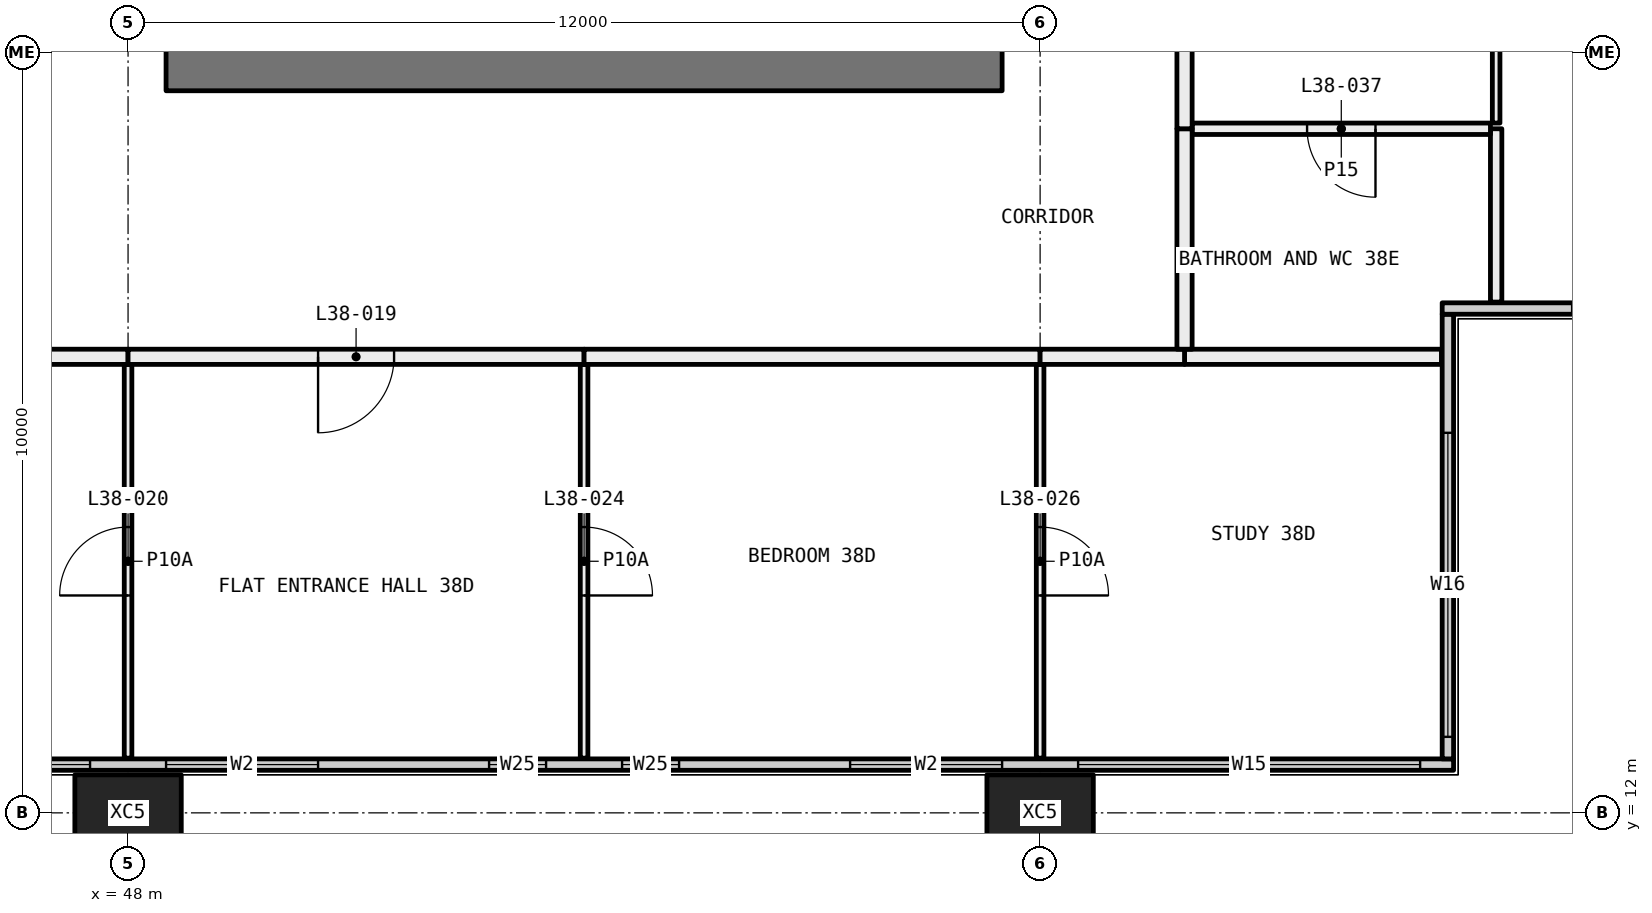
"""IFC4 building model, lengths in metres.
Left out: names, types, materials, properties, quantities, classifications, styles, units other than length and angle.
Written with IfcOpenShell. Run it as: python <this file> out.ifc"""

import sys

from ifc_helpers import new_model, si_unit, direction, frame, frame_2d, origin, origin_2d, place, context, subcontext, project, spatial, rectangle, hollow_rectangle, extrude, element, fill, save


model = new_model("IFC4")
c1 = context("Model", 3, precision=1e-05, world=origin(), true_north=direction((0.0, 1.0)))
c2 = subcontext(c1, "Body", "Model", "MODEL_VIEW")
j1 = project(units=[si_unit("LENGTHUNIT", "METRE"), si_unit("PLANEANGLEUNIT", "RADIAN")], contexts=[c1])
p1 = place(None, origin())
s1 = spatial("IfcSite", under=j1, at=p1, CompositionType="ELEMENT")
p2 = place(p1, origin())
s2 = spatial("IfcBuilding", under=s1, at=p2, CompositionType="ELEMENT")
p3 = place(p2, frame((0.0, 0.0, 144.9)))
s3 = spatial("IfcBuildingStorey", under=s2, at=p3, CompositionType="ELEMENT", Elevation=144.9)
for number, where, z_axis, x_axis in (
    (1, (48.0, 12.0, -0.4), (0.0, 0.0, 1.0), (1.0, 0.0, 0.0)),
    (2, (60.0, 12.0, -0.4), (0.0, 0.0, 1.0), (1.0, 0.0, 0.0)),
):
    element("IfcColumn", number, at=place(p3, frame(where, z_axis=z_axis, x_axis=x_axis)), inside=s3, PredefinedType="COLUMN", context=c2, shape_type="SweptSolid", body=[
        extrude(hollow_rectangle(XDim=1.4, YDim=1.0, WallThickness=0.055, at=origin_2d()), origin(), (0.0, 0.0, 1.0), 3.45),
    ])
p4 = place(p3, frame((6.56, 12.635, 0.0), z_axis=(0.0, 0.0, 1.0), x_axis=(1.0, 0.0, 0.0)))
e3 = element("IfcWall", 3, at=p4, inside=s3, PredefinedType="ELEMENTEDWALL", context=c2, shape_type="SweptSolid", body=[
    extrude(rectangle(XDim=58.88, YDim=0.15, at=frame_2d((29.44, 0.0))), origin(), (0.0, 0.0, 1.0), 3.05),
])
p5 = place(p4, frame((0.44, 0.0, 0.45)))
e4 = element("IfcOpeningElement", 4, at=p5, cuts=e3, PredefinedType="OPENING", context=c2, shape_type="SweptSolid", body=[
    extrude(rectangle(XDim=4.5, YDim=2.55, at=frame_2d((2.25, 1.275))), frame((0.0, 0.085, 0.0), z_axis=(0.0, -1.0, 0.0), x_axis=(1.0, 0.0, 0.0)), (0.0, 0.0, 1.0), 0.17),
])
p6 = place(p4, frame((5.94, 0.0, 0.45)))
e5 = element("IfcOpeningElement", 5, at=p6, cuts=e3, PredefinedType="OPENING", context=c2, shape_type="SweptSolid", body=[
    extrude(rectangle(XDim=2.0, YDim=2.55, at=frame_2d((1.0, 1.275))), frame((0.0, 0.085, 0.0), z_axis=(0.0, -1.0, 0.0), x_axis=(1.0, 0.0, 0.0)), (0.0, 0.0, 1.0), 0.17),
])
p7 = place(p4, frame((10.19, 0.0, 0.45)))
e6 = element("IfcOpeningElement", 6, at=p7, cuts=e3, PredefinedType="OPENING", context=c2, shape_type="SweptSolid", body=[
    extrude(rectangle(XDim=0.75, YDim=2.55, at=frame_2d((0.375, 1.275))), frame((0.0, 0.085, 0.0), z_axis=(0.0, -1.0, 0.0), x_axis=(1.0, 0.0, 0.0)), (0.0, 0.0, 1.0), 0.17),
])
p8 = place(p4, frame((11.94, 0.0, 0.45)))
e7 = element("IfcOpeningElement", 7, at=p8, cuts=e3, PredefinedType="OPENING", context=c2, shape_type="SweptSolid", body=[
    extrude(rectangle(XDim=0.75, YDim=2.55, at=frame_2d((0.375, 1.275))), frame((0.0, 0.085, 0.0), z_axis=(0.0, -1.0, 0.0), x_axis=(1.0, 0.0, 0.0)), (0.0, 0.0, 1.0), 0.17),
])
p9 = place(p4, frame((14.94, 0.0, 0.45)))
e8 = element("IfcOpeningElement", 8, at=p9, cuts=e3, PredefinedType="OPENING", context=c2, shape_type="SweptSolid", body=[
    extrude(rectangle(XDim=2.0, YDim=2.55, at=frame_2d((1.0, 1.275))), frame((0.0, 0.085, 0.0), z_axis=(0.0, -1.0, 0.0), x_axis=(1.0, 0.0, 0.0)), (0.0, 0.0, 1.0), 0.17),
])
p10 = place(p4, frame((17.94, 0.0, 0.45)))
e9 = element("IfcOpeningElement", 9, at=p10, cuts=e3, PredefinedType="OPENING", context=c2, shape_type="SweptSolid", body=[
    extrude(rectangle(XDim=2.0, YDim=2.55, at=frame_2d((1.0, 1.275))), frame((0.0, 0.085, 0.0), z_axis=(0.0, -1.0, 0.0), x_axis=(1.0, 0.0, 0.0)), (0.0, 0.0, 1.0), 0.17),
])
p11 = place(p4, frame((22.19, 0.0, 0.45)))
e10 = element("IfcOpeningElement", 10, at=p11, cuts=e3, PredefinedType="OPENING", context=c2, shape_type="SweptSolid", body=[
    extrude(rectangle(XDim=0.75, YDim=2.55, at=frame_2d((0.375, 1.275))), frame((0.0, 0.085, 0.0), z_axis=(0.0, -1.0, 0.0), x_axis=(1.0, 0.0, 0.0)), (0.0, 0.0, 1.0), 0.17),
])
p12 = place(p4, frame((23.94, 0.0, 0.45)))
e11 = element("IfcOpeningElement", 11, at=p12, cuts=e3, PredefinedType="OPENING", context=c2, shape_type="SweptSolid", body=[
    extrude(rectangle(XDim=0.75, YDim=2.55, at=frame_2d((0.375, 1.275))), frame((0.0, 0.085, 0.0), z_axis=(0.0, -1.0, 0.0), x_axis=(1.0, 0.0, 0.0)), (0.0, 0.0, 1.0), 0.17),
])
p13 = place(p4, frame((26.94, 0.0, 0.45)))
e12 = element("IfcOpeningElement", 12, at=p13, cuts=e3, PredefinedType="OPENING", context=c2, shape_type="SweptSolid", body=[
    extrude(rectangle(XDim=2.0, YDim=2.55, at=frame_2d((1.0, 1.275))), frame((0.0, 0.085, 0.0), z_axis=(0.0, -1.0, 0.0), x_axis=(1.0, 0.0, 0.0)), (0.0, 0.0, 1.0), 0.17),
])
p14 = place(p4, frame((29.94, 0.0, 0.45)))
e13 = element("IfcOpeningElement", 13, at=p14, cuts=e3, PredefinedType="OPENING", context=c2, shape_type="SweptSolid", body=[
    extrude(rectangle(XDim=2.0, YDim=2.55, at=frame_2d((1.0, 1.275))), frame((0.0, 0.085, 0.0), z_axis=(0.0, -1.0, 0.0), x_axis=(1.0, 0.0, 0.0)), (0.0, 0.0, 1.0), 0.17),
])
p15 = place(p4, frame((34.19, 0.0, 0.45)))
e14 = element("IfcOpeningElement", 14, at=p15, cuts=e3, PredefinedType="OPENING", context=c2, shape_type="SweptSolid", body=[
    extrude(rectangle(XDim=0.75, YDim=2.55, at=frame_2d((0.375, 1.275))), frame((0.0, 0.085, 0.0), z_axis=(0.0, -1.0, 0.0), x_axis=(1.0, 0.0, 0.0)), (0.0, 0.0, 1.0), 0.17),
])
p16 = place(p4, frame((35.94, 0.0, 0.45)))
e15 = element("IfcOpeningElement", 15, at=p16, cuts=e3, PredefinedType="OPENING", context=c2, shape_type="SweptSolid", body=[
    extrude(rectangle(XDim=0.75, YDim=2.55, at=frame_2d((0.375, 1.275))), frame((0.0, 0.085, 0.0), z_axis=(0.0, -1.0, 0.0), x_axis=(1.0, 0.0, 0.0)), (0.0, 0.0, 1.0), 0.17),
])
p17 = place(p4, frame((38.94, 0.0, 0.45)))
e16 = element("IfcOpeningElement", 16, at=p17, cuts=e3, PredefinedType="OPENING", context=c2, shape_type="SweptSolid", body=[
    extrude(rectangle(XDim=2.0, YDim=2.55, at=frame_2d((1.0, 1.275))), frame((0.0, 0.085, 0.0), z_axis=(0.0, -1.0, 0.0), x_axis=(1.0, 0.0, 0.0)), (0.0, 0.0, 1.0), 0.17),
])
p18 = place(p4, frame((41.94, 0.0, 0.45)))
e17 = element("IfcOpeningElement", 17, at=p18, cuts=e3, PredefinedType="OPENING", context=c2, shape_type="SweptSolid", body=[
    extrude(rectangle(XDim=2.0, YDim=2.55, at=frame_2d((1.0, 1.275))), frame((0.0, 0.085, 0.0), z_axis=(0.0, -1.0, 0.0), x_axis=(1.0, 0.0, 0.0)), (0.0, 0.0, 1.0), 0.17),
])
p19 = place(p4, frame((46.19, 0.0, 0.45)))
e18 = element("IfcOpeningElement", 18, at=p19, cuts=e3, PredefinedType="OPENING", context=c2, shape_type="SweptSolid", body=[
    extrude(rectangle(XDim=0.75, YDim=2.55, at=frame_2d((0.375, 1.275))), frame((0.0, 0.085, 0.0), z_axis=(0.0, -1.0, 0.0), x_axis=(1.0, 0.0, 0.0)), (0.0, 0.0, 1.0), 0.17),
])
p20 = place(p4, frame((47.94, 0.0, 0.45)))
e19 = element("IfcOpeningElement", 19, at=p20, cuts=e3, PredefinedType="OPENING", context=c2, shape_type="SweptSolid", body=[
    extrude(rectangle(XDim=0.75, YDim=2.55, at=frame_2d((0.375, 1.275))), frame((0.0, 0.085, 0.0), z_axis=(0.0, -1.0, 0.0), x_axis=(1.0, 0.0, 0.0)), (0.0, 0.0, 1.0), 0.17),
])
p21 = place(p4, frame((50.94, 0.0, 0.45)))
e20 = element("IfcOpeningElement", 20, at=p21, cuts=e3, PredefinedType="OPENING", context=c2, shape_type="SweptSolid", body=[
    extrude(rectangle(XDim=2.0, YDim=2.55, at=frame_2d((1.0, 1.275))), frame((0.0, 0.085, 0.0), z_axis=(0.0, -1.0, 0.0), x_axis=(1.0, 0.0, 0.0)), (0.0, 0.0, 1.0), 0.17),
])
p22 = place(p4, frame((53.94, 0.0, 0.45)))
e21 = element("IfcOpeningElement", 21, at=p22, cuts=e3, PredefinedType="OPENING", context=c2, shape_type="SweptSolid", body=[
    extrude(rectangle(XDim=4.5, YDim=2.55, at=frame_2d((2.25, 1.275))), frame((0.0, 0.085, 0.0), z_axis=(0.0, -1.0, 0.0), x_axis=(1.0, 0.0, 0.0)), (0.0, 0.0, 1.0), 0.17),
])
p23 = place(p3, frame((65.365, 12.71, 0.0), z_axis=(0.0, 0.0, 1.0), x_axis=(0.0, 1.0, 0.0)))
e22 = element("IfcWall", 22, at=p23, inside=s3, PredefinedType="ELEMENTEDWALL", context=c2, shape_type="SweptSolid", body=[
    extrude(rectangle(XDim=5.85, YDim=0.15, at=frame_2d((2.925, 0.0))), origin(), (0.0, 0.0, 1.0), 3.05),
])
p24 = place(p23, frame((0.29, 0.0, 0.45)))
e23 = element("IfcOpeningElement", 23, at=p24, cuts=e22, PredefinedType="OPENING", context=c2, shape_type="SweptSolid", body=[
    extrude(rectangle(XDim=4.0, YDim=2.55, at=frame_2d((2.0, 1.275))), frame((0.0, 0.085, 0.0), z_axis=(0.0, -1.0, 0.0), x_axis=(1.0, 0.0, 0.0)), (0.0, 0.0, 1.0), 0.17),
])
p25 = place(p3, frame((65.29, 18.635, 0.0), z_axis=(0.0, 0.0, 1.0), x_axis=(1.0, 0.0, 0.0)))
e24 = element("IfcWall", 24, at=p25, inside=s3, PredefinedType="ELEMENTEDWALL", context=c2, shape_type="SweptSolid", body=[
    extrude(rectangle(XDim=6.15, YDim=0.15, at=frame_2d((3.075, 0.0))), origin(), (0.0, 0.0, 1.0), 3.05),
])
p26 = place(p25, frame((1.71, 0.0, 0.45)))
e25 = element("IfcOpeningElement", 25, at=p26, cuts=e24, PredefinedType="OPENING", context=c2, shape_type="SweptSolid", body=[
    extrude(rectangle(XDim=4.0, YDim=2.55, at=frame_2d((2.0, 1.275))), frame((0.0, 0.085, 0.0), z_axis=(0.0, -1.0, 0.0), x_axis=(1.0, 0.0, 0.0)), (0.0, 0.0, 1.0), 0.17),
])
p27 = place(p3, frame((48.0, 12.72, 0.0), z_axis=(0.0, 0.0, 1.0), x_axis=(0.0, 1.0, 0.0)))
e26 = element("IfcWall", 26, at=p27, inside=s3, PredefinedType="PARTITIONING", context=c2, shape_type="SweptSolid", body=[
    extrude(rectangle(XDim=5.18, YDim=0.1, at=frame_2d((2.59, 0.0))), origin(), (0.0, 0.0, 1.0), 3.05),
])
p28 = place(p27, frame((2.14, 0.0, 0.0)))
e27 = element("IfcOpeningElement", 27, at=p28, cuts=e26, PredefinedType="OPENING", context=c2, shape_type="SweptSolid", body=[
    extrude(rectangle(XDim=0.9, YDim=2.1, at=frame_2d((0.45, 1.05))), frame((0.0, 0.06, 0.0), z_axis=(0.0, -1.0, 0.0), x_axis=(1.0, 0.0, 0.0)), (0.0, 0.0, 1.0), 0.12),
])
p29 = place(p3, frame((48.0, 18.0, 0.0), z_axis=(0.0, 0.0, 1.0), x_axis=(-1.0, 0.0, 0.0)))
e28 = element("IfcWall", 28, at=p29, inside=s3, PredefinedType="PARTITIONING", context=c2, shape_type="SweptSolid", body=[
    extrude(rectangle(XDim=1.9, YDim=0.2, at=frame_2d((0.95, 0.0))), origin(), (0.0, 0.0, 1.0), 3.05),
])
p30 = place(p3, frame((54.0, 12.72, 0.0), z_axis=(0.0, 0.0, 1.0), x_axis=(0.0, 1.0, 0.0)))
e29 = element("IfcWall", 29, at=p30, inside=s3, PredefinedType="PARTITIONING", context=c2, shape_type="SweptSolid", body=[
    extrude(rectangle(XDim=5.18, YDim=0.1, at=frame_2d((2.59, 0.0))), origin(), (0.0, 0.0, 1.0), 3.05),
])
p31 = place(p30, frame((2.14, 0.0, 0.0)))
e30 = element("IfcOpeningElement", 30, at=p31, cuts=e29, PredefinedType="OPENING", context=c2, shape_type="SweptSolid", body=[
    extrude(rectangle(XDim=0.9, YDim=2.1, at=frame_2d((0.45, 1.05))), frame((0.0, 0.06, 0.0), z_axis=(0.0, -1.0, 0.0), x_axis=(1.0, 0.0, 0.0)), (0.0, 0.0, 1.0), 0.12),
])
p32 = place(p3, frame((54.0, 18.0, 0.0), z_axis=(0.0, 0.0, 1.0), x_axis=(-1.0, 0.0, 0.0)))
e31 = element("IfcWall", 31, at=p32, inside=s3, PredefinedType="PARTITIONING", context=c2, shape_type="SweptSolid", body=[
    extrude(rectangle(XDim=6.0, YDim=0.2, at=frame_2d((3.0, 0.0))), origin(), (0.0, 0.0, 1.0), 3.05),
])
p33 = place(p32, frame((2.5, 0.0, 0.0)))
e32 = element("IfcOpeningElement", 32, at=p33, cuts=e31, PredefinedType="OPENING", context=c2, shape_type="SweptSolid", body=[
    extrude(rectangle(XDim=1.0, YDim=2.1, at=frame_2d((0.5, 1.05))), frame((0.0, 0.11, 0.0), z_axis=(0.0, -1.0, 0.0), x_axis=(1.0, 0.0, 0.0)), (0.0, 0.0, 1.0), 0.22),
])
p34 = place(p3, frame((60.0, 12.72, 0.0), z_axis=(0.0, 0.0, 1.0), x_axis=(0.0, 1.0, 0.0)))
e33 = element("IfcWall", 33, at=p34, inside=s3, PredefinedType="PARTITIONING", context=c2, shape_type="SweptSolid", body=[
    extrude(rectangle(XDim=5.18, YDim=0.1, at=frame_2d((2.59, 0.0))), origin(), (0.0, 0.0, 1.0), 3.05),
])
p35 = place(p34, frame((2.14, 0.0, 0.0)))
e34 = element("IfcOpeningElement", 34, at=p35, cuts=e33, PredefinedType="OPENING", context=c2, shape_type="SweptSolid", body=[
    extrude(rectangle(XDim=0.9, YDim=2.1, at=frame_2d((0.45, 1.05))), frame((0.0, 0.06, 0.0), z_axis=(0.0, -1.0, 0.0), x_axis=(1.0, 0.0, 0.0)), (0.0, 0.0, 1.0), 0.12),
])
p36 = place(p3, frame((60.0, 18.0, 0.0), z_axis=(0.0, 0.0, 1.0), x_axis=(-1.0, 0.0, 0.0)))
e35 = element("IfcWall", 35, at=p36, inside=s3, PredefinedType="PARTITIONING", context=c2, shape_type="SweptSolid", body=[
    extrude(rectangle(XDim=6.0, YDim=0.2, at=frame_2d((3.0, 0.0))), origin(), (0.0, 0.0, 1.0), 3.05),
])
p37 = place(p3, frame((65.28, 18.0, 0.0), z_axis=(0.0, 0.0, 1.0), x_axis=(-1.0, 0.0, 0.0)))
e36 = element("IfcWall", 36, at=p37, inside=s3, PredefinedType="PARTITIONING", context=c2, shape_type="SweptSolid", body=[
    extrude(rectangle(XDim=3.38, YDim=0.2, at=frame_2d((1.69, 0.0))), origin(), (0.0, 0.0, 1.0), 3.05),
])
p38 = place(p3, frame((61.9, 18.0, 0.0), z_axis=(0.0, 0.0, 1.0), x_axis=(-1.0, 0.0, 0.0)))
e37 = element("IfcWall", 37, at=p38, inside=s3, PredefinedType="PARTITIONING", context=c2, shape_type="SweptSolid", body=[
    extrude(rectangle(XDim=1.9, YDim=0.2, at=frame_2d((0.95, 0.0))), origin(), (0.0, 0.0, 1.0), 3.05),
])
p39 = place(p3, frame((66.0, 21.0, 0.0), z_axis=(0.0, 0.0, 1.0), x_axis=(0.0, -1.0, 0.0)))
e38 = element("IfcWall", 38, at=p39, inside=s3, PredefinedType="PARTITIONING", context=c2, shape_type="SweptSolid", body=[
    extrude(rectangle(XDim=2.28, YDim=0.15, at=frame_2d((1.14, 0.0))), origin(), (0.0, 0.0, 1.0), 3.05),
])
p40 = place(p3, frame((66.0, 23.95, 0.0), z_axis=(0.0, 0.0, 1.0), x_axis=(0.0, -1.0, 0.0)))
e39 = element("IfcWall", 39, at=p40, inside=s3, PredefinedType="PARTITIONING", context=c2, shape_type="SweptSolid", body=[
    extrude(rectangle(XDim=2.875, YDim=0.1, at=frame_2d((1.438, 0.0))), origin(), (0.0, 0.0, 1.0), 2.45),
])
p41 = place(p40, frame((0.988, 0.0, 0.0)))
e40 = element("IfcOpeningElement", 40, at=p41, cuts=e39, PredefinedType="OPENING", context=c2, shape_type="SweptSolid", body=[
    extrude(rectangle(XDim=0.9, YDim=2.1, at=frame_2d((0.45, 1.05))), frame((0.0, 0.06, 0.0), z_axis=(0.0, -1.0, 0.0), x_axis=(1.0, 0.0, 0.0)), (0.0, 0.0, 1.0), 0.12),
])
p42 = place(p3, frame((65.925, 21.0, 0.0), z_axis=(0.0, 0.0, 1.0), x_axis=(-1.0, 0.0, 0.0)))
e41 = element("IfcWall", 41, at=p42, inside=s3, PredefinedType="PARTITIONING", context=c2, shape_type="SweptSolid", body=[
    extrude(rectangle(XDim=3.925, YDim=0.15, at=frame_2d((1.962, 0.0))), origin(), (0.0, 0.0, 1.0), 3.05),
])
p43 = place(p42, frame((1.512, 0.0, 0.0)))
e42 = element("IfcOpeningElement", 42, at=p43, cuts=e41, PredefinedType="OPENING", context=c2, shape_type="SweptSolid", body=[
    extrude(rectangle(XDim=0.9, YDim=2.1, at=frame_2d((0.45, 1.05))), frame((0.0, 0.085, 0.0), z_axis=(0.0, -1.0, 0.0), x_axis=(1.0, 0.0, 0.0)), (0.0, 0.0, 1.0), 0.17),
])
for number, where, z_axis, x_axis in (
    (43, (61.9, 21.0, 0.0), (0.0, 0.0, 1.0), (0.0, -1.0, 0.0)),
    (44, (61.9, 23.9, 0.0), (0.0, 0.0, 1.0), (0.0, -1.0, 0.0)),
):
    element("IfcWall", number, at=place(p3, frame(where, z_axis=z_axis, x_axis=x_axis)), inside=s3, PredefinedType="PARTITIONING", context=c2, shape_type="SweptSolid", body=[
        extrude(rectangle(XDim=2.9, YDim=0.2, at=frame_2d((1.45, 0.0))), origin(), (0.0, 0.0, 1.0), 3.05),
    ])
p44 = place(p3, frame((59.5, 21.825, 0.0), z_axis=(0.0, 0.0, 1.0), x_axis=(-1.0, 0.0, 0.0)))
e45 = element("IfcWall", 45, at=p44, inside=s3, PredefinedType="SHEAR", context=c2, shape_type="SweptSolid", body=[
    extrude(rectangle(XDim=11.0, YDim=0.65, at=frame_2d((5.5, 0.0))), origin(), (0.0, 0.0, 1.0), 3.05),
])
p45 = place(p17, origin())
e46 = element("IfcWindow", 46, at=p45, inside=s3, PartitioningType="SINGLE_PANEL", PredefinedType="WINDOW", context=c2, shape_type="SweptSolid", body=[
    extrude(rectangle(XDim=2.0, YDim=2.55, at=frame_2d((1.0, 1.275))), frame((0.0, 0.03, 0.0), z_axis=(0.0, -1.0, 0.0), x_axis=(1.0, 0.0, 0.0)), (0.0, 0.0, 1.0), 0.06),
])
fill(e16, e46)
p46 = place(p18, origin())
e47 = element("IfcWindow", 47, at=p46, inside=s3, PartitioningType="SINGLE_PANEL", PredefinedType="WINDOW", context=c2, shape_type="SweptSolid", body=[
    extrude(rectangle(XDim=2.0, YDim=2.55, at=frame_2d((1.0, 1.275))), frame((0.0, 0.03, 0.0), z_axis=(0.0, -1.0, 0.0), x_axis=(1.0, 0.0, 0.0)), (0.0, 0.0, 1.0), 0.06),
])
fill(e17, e47)
p47 = place(p19, origin())
e48 = element("IfcWindow", 48, at=p47, inside=s3, PartitioningType="SINGLE_PANEL", PredefinedType="WINDOW", context=c2, shape_type="SweptSolid", body=[
    extrude(rectangle(XDim=0.75, YDim=2.55, at=frame_2d((0.375, 1.275))), frame((0.0, 0.03, 0.0), z_axis=(0.0, -1.0, 0.0), x_axis=(1.0, 0.0, 0.0)), (0.0, 0.0, 1.0), 0.06),
])
fill(e18, e48)
p48 = place(p20, origin())
e49 = element("IfcWindow", 49, at=p48, inside=s3, PartitioningType="SINGLE_PANEL", PredefinedType="WINDOW", context=c2, shape_type="SweptSolid", body=[
    extrude(rectangle(XDim=0.75, YDim=2.55, at=frame_2d((0.375, 1.275))), frame((0.0, 0.03, 0.0), z_axis=(0.0, -1.0, 0.0), x_axis=(1.0, 0.0, 0.0)), (0.0, 0.0, 1.0), 0.06),
])
fill(e19, e49)
p49 = place(p21, origin())
e50 = element("IfcWindow", 50, at=p49, inside=s3, PartitioningType="SINGLE_PANEL", PredefinedType="WINDOW", context=c2, shape_type="SweptSolid", body=[
    extrude(rectangle(XDim=2.0, YDim=2.55, at=frame_2d((1.0, 1.275))), frame((0.0, 0.03, 0.0), z_axis=(0.0, -1.0, 0.0), x_axis=(1.0, 0.0, 0.0)), (0.0, 0.0, 1.0), 0.06),
])
fill(e20, e50)
p50 = place(p22, origin())
e51 = element("IfcWindow", 51, at=p50, inside=s3, PartitioningType="SINGLE_PANEL", PredefinedType="WINDOW", context=c2, shape_type="SweptSolid", body=[
    extrude(rectangle(XDim=4.5, YDim=2.55, at=frame_2d((2.25, 1.275))), frame((0.0, 0.03, 0.0), z_axis=(0.0, -1.0, 0.0), x_axis=(1.0, 0.0, 0.0)), (0.0, 0.0, 1.0), 0.06),
])
fill(e21, e51)
p51 = place(p24, origin())
e52 = element("IfcWindow", 52, at=p51, inside=s3, PartitioningType="SINGLE_PANEL", PredefinedType="WINDOW", context=c2, shape_type="SweptSolid", body=[
    extrude(rectangle(XDim=4.0, YDim=2.55, at=frame_2d((2.0, 1.275))), frame((0.0, 0.03, 0.0), z_axis=(0.0, -1.0, 0.0), x_axis=(1.0, 0.0, 0.0)), (0.0, 0.0, 1.0), 0.06),
])
fill(e23, e52)
p52 = place(p33, origin())
e53 = element("IfcDoor", 53, at=p52, inside=s3, OperationType="SINGLE_SWING_LEFT", PredefinedType="DOOR", context=c2, shape_type="SweptSolid", body=[
    extrude(rectangle(XDim=1.0, YDim=2.1, at=frame_2d((0.5, 1.05))), frame((0.0, 0.025, 0.0), z_axis=(0.0, -1.0, 0.0), x_axis=(1.0, 0.0, 0.0)), (0.0, 0.0, 1.0), 0.05),
])
fill(e32, e53)
p53 = place(p28, origin())
e54 = element("IfcDoor", 54, at=p53, inside=s3, OperationType="SINGLE_SWING_RIGHT", PredefinedType="DOOR", context=c2, shape_type="SweptSolid", body=[
    extrude(rectangle(XDim=0.9, YDim=2.1, at=frame_2d((0.45, 1.05))), frame((0.0, 0.025, 0.0), z_axis=(0.0, -1.0, 0.0), x_axis=(1.0, 0.0, 0.0)), (0.0, 0.0, 1.0), 0.05),
])
fill(e27, e54)
p54 = place(p31, frame((0.9, 0.0, 0.0), x_axis=(-1.0, 0.0, 0.0)))
e55 = element("IfcDoor", 55, at=p54, inside=s3, OperationType="SINGLE_SWING_LEFT", PredefinedType="DOOR", context=c2, shape_type="SweptSolid", body=[
    extrude(rectangle(XDim=0.9, YDim=2.1, at=frame_2d((0.45, 1.05))), frame((0.0, 0.025, 0.0), z_axis=(0.0, -1.0, 0.0), x_axis=(1.0, 0.0, 0.0)), (0.0, 0.0, 1.0), 0.05),
])
fill(e30, e55)
p55 = place(p35, frame((0.9, 0.0, 0.0), x_axis=(-1.0, 0.0, 0.0)))
e56 = element("IfcDoor", 56, at=p55, inside=s3, OperationType="SINGLE_SWING_LEFT", PredefinedType="DOOR", context=c2, shape_type="SweptSolid", body=[
    extrude(rectangle(XDim=0.9, YDim=2.1, at=frame_2d((0.45, 1.05))), frame((0.0, 0.025, 0.0), z_axis=(0.0, -1.0, 0.0), x_axis=(1.0, 0.0, 0.0)), (0.0, 0.0, 1.0), 0.05),
])
fill(e34, e56)
p56 = place(p43, origin())
e57 = element("IfcDoor", 57, at=p56, inside=s3, OperationType="SINGLE_SWING_RIGHT", PredefinedType="DOOR", context=c2, shape_type="SweptSolid", body=[
    extrude(rectangle(XDim=0.9, YDim=2.1, at=frame_2d((0.45, 1.05))), frame((0.0, 0.025, 0.0), z_axis=(0.0, -1.0, 0.0), x_axis=(1.0, 0.0, 0.0)), (0.0, 0.0, 1.0), 0.05),
])
fill(e42, e57)
save(model, sys.argv[1])
